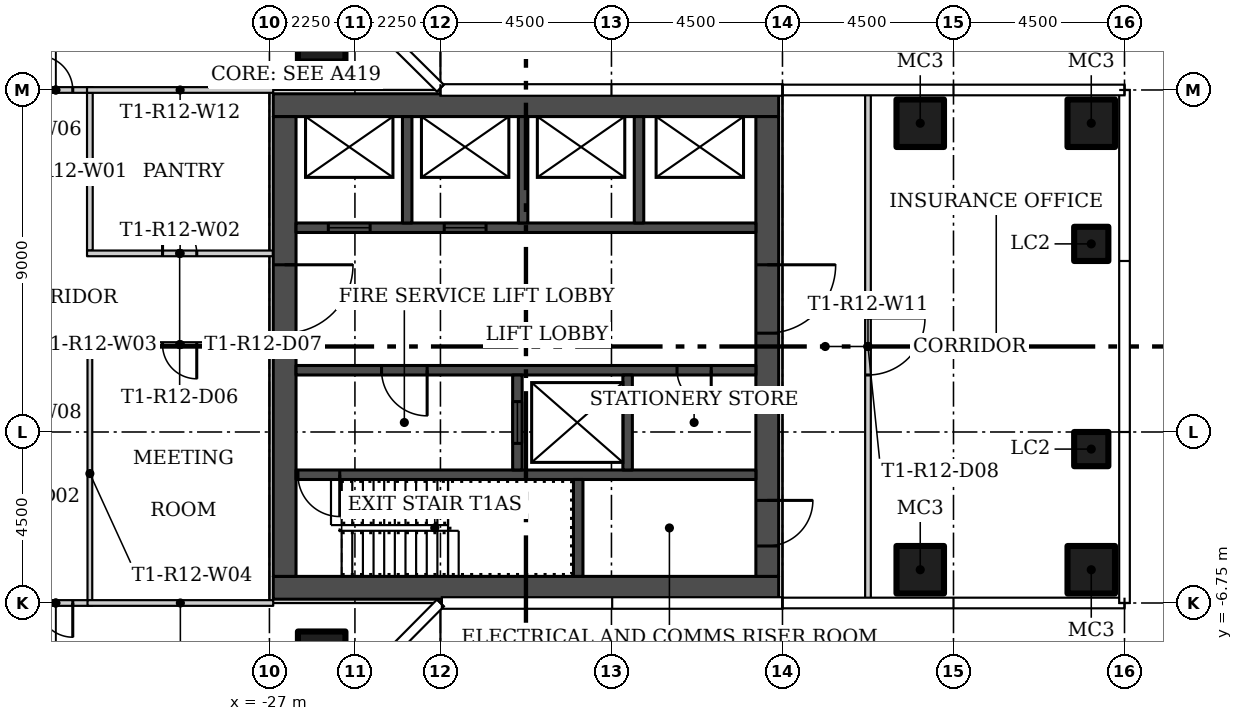
"""IFC4 building model, lengths in metres.
Left out: names, types, materials, properties, quantities, classifications, styles, units other than length and angle.
Written with IfcOpenShell. Run it as: python <this file> out.ifc"""

import sys

from ifc_helpers import new_model, si_unit, direction, frame, frame_2d, origin, origin_2d, place, context, subcontext, project, spatial, rectangle, hollow_rectangle, extrude, element, fill, save


model = new_model("IFC4")
c1 = context("Model", 3, precision=1e-05, world=origin(), true_north=direction((0.0, 1.0)))
c2 = subcontext(c1, "Body", "Model", "MODEL_VIEW")
j1 = project(units=[si_unit("LENGTHUNIT", "METRE"), si_unit("PLANEANGLEUNIT", "RADIAN")], contexts=[c1])
p1 = place(None, origin())
s1 = spatial("IfcSite", under=j1, at=p1, CompositionType="ELEMENT")
p2 = place(p1, origin())
s2 = spatial("IfcBuilding", under=s1, at=p2, CompositionType="ELEMENT")
p3 = place(p2, frame((0.0, 0.0, 113.1)))
s3 = spatial("IfcBuildingStorey", under=s2, at=p3, CompositionType="ELEMENT", Elevation=113.1)
for number, where in (
    (1, (-25.625, 8.125, 0.0)),
    (2, (-25.625, -8.125, 0.0)),
    (3, (-9.875, -5.875, 0.0)),
    (4, (-5.375, -5.875, 0.0)),
    (5, (-9.875, 5.875, 0.0)),
    (6, (-5.375, 5.875, 0.0)),
):
    element("IfcColumn", number, at=place(p3, frame(where)), inside=s3, PredefinedType="COLUMN", context=c2, shape_type="SweptSolid", body=[
        extrude(hollow_rectangle(XDim=1.25, YDim=1.25, WallThickness=0.05, at=origin_2d()), origin(), (0.0, 0.0, 1.0), 3.55),
    ])
for number, where in (
    (7, (-5.375, -2.7, 0.0)),
    (8, (-5.375, 2.7, 0.0)),
):
    element("IfcColumn", number, at=place(p3, frame(where)), inside=s3, PredefinedType="COLUMN", context=c2, shape_type="SweptSolid", body=[
        extrude(hollow_rectangle(XDim=0.9, YDim=0.9, WallThickness=0.036, at=origin_2d()), origin(), (0.0, 0.0, 1.0), 3.55),
    ])
p4 = place(p3, frame((-31.725, 6.675, 0.0), z_axis=(0.0, 0.0, 1.0), x_axis=(0.0, -1.0, 0.0)))
e9 = element("IfcWall", 9, at=p4, inside=s3, PredefinedType="PARTITIONING", context=c2, shape_type="SweptSolid", body=[
    extrude(rectangle(XDim=4.15, YDim=0.15, at=frame_2d((2.075, 0.0))), origin(), (0.0, 0.0, 1.0), 3.55),
])
p5 = place(p3, frame((-31.8, 2.45, 0.0)))
e10 = element("IfcWall", 10, at=p5, inside=s3, PredefinedType="PARTITIONING", context=c2, shape_type="SweptSolid", body=[
    extrude(rectangle(XDim=4.9, YDim=0.15, at=frame_2d((2.45, 0.0))), origin(), (0.0, 0.0, 1.0), 3.55),
])
p6 = place(p5, frame((1.987, 0.0, 0.0)))
e11 = element("IfcOpeningElement", 11, at=p6, cuts=e10, PredefinedType="OPENING", context=c2, shape_type="SweptSolid", body=[
    extrude(rectangle(XDim=0.9, YDim=2.1, at=frame_2d((0.45, 1.05))), frame((0.0, 0.085, 0.0), z_axis=(0.0, -1.0, 0.0), x_axis=(1.0, 0.0, 0.0)), (0.0, 0.0, 1.0), 0.17),
])
p7 = place(p3, frame((-26.9, 0.05, 0.0), z_axis=(0.0, 0.0, 1.0), x_axis=(-1.0, 0.0, 0.0)))
e12 = element("IfcWall", 12, at=p7, inside=s3, PredefinedType="PARTITIONING", context=c2, shape_type="SweptSolid", body=[
    extrude(rectangle(XDim=4.887, YDim=0.125, at=frame_2d((2.444, 0.0))), origin(), (0.0, 0.0, 1.0), 3.55),
])
p8 = place(p7, frame((2.012, 0.0, 0.0)))
e13 = element("IfcOpeningElement", 13, at=p8, cuts=e12, PredefinedType="OPENING", context=c2, shape_type="SweptSolid", body=[
    extrude(rectangle(XDim=0.9, YDim=2.1, at=frame_2d((0.45, 1.05))), frame((0.0, 0.073, 0.0), z_axis=(0.0, -1.0, 0.0), x_axis=(1.0, 0.0, 0.0)), (0.0, 0.0, 1.0), 0.145),
])
p9 = place(p3, frame((-31.725, -0.013, 0.0), z_axis=(0.0, 0.0, 1.0), x_axis=(0.0, -1.0, 0.0)))
e14 = element("IfcWall", 14, at=p9, inside=s3, PredefinedType="PARTITIONING", context=c2, shape_type="SweptSolid", body=[
    extrude(rectangle(XDim=6.662, YDim=0.125, at=frame_2d((3.331, 0.0))), origin(), (0.0, 0.0, 1.0), 3.55),
])
p10 = place(p3, frame((-33.588, 6.75, 0.0)))
e15 = element("IfcWall", 15, at=p10, inside=s3, PredefinedType="PARTITIONING", context=c2, shape_type="SweptSolid", body=[
    extrude(rectangle(XDim=1.938, YDim=0.15, at=frame_2d((0.969, 0.0))), origin(), (0.0, 0.0, 1.0), 3.55),
])
p11 = place(p10, frame((0.513, 0.0, 0.0)))
e16 = element("IfcOpeningElement", 16, at=p11, cuts=e15, PredefinedType="OPENING", context=c2, shape_type="SweptSolid", body=[
    extrude(rectangle(XDim=0.9, YDim=2.1, at=frame_2d((0.45, 1.05))), frame((0.0, 0.085, 0.0), z_axis=(0.0, -1.0, 0.0), x_axis=(1.0, 0.0, 0.0)), (0.0, 0.0, 1.0), 0.17),
])
p12 = place(p3, frame((-31.662, -6.75, 0.0), z_axis=(0.0, 0.0, 1.0), x_axis=(-1.0, 0.0, 0.0)))
e17 = element("IfcWall", 17, at=p12, inside=s3, PredefinedType="PARTITIONING", context=c2, shape_type="SweptSolid", body=[
    extrude(rectangle(XDim=1.913, YDim=0.15, at=frame_2d((0.957, 0.0))), origin(), (0.0, 0.0, 1.0), 3.55),
])
p13 = place(p12, frame((0.513, 0.0, 0.0)))
e18 = element("IfcOpeningElement", 18, at=p13, cuts=e17, PredefinedType="OPENING", context=c2, shape_type="SweptSolid", body=[
    extrude(rectangle(XDim=0.9, YDim=2.1, at=frame_2d((0.45, 1.05))), frame((0.0, 0.085, 0.0), z_axis=(0.0, -1.0, 0.0), x_axis=(1.0, 0.0, 0.0)), (0.0, 0.0, 1.0), 0.17),
])
p14 = place(p3, frame((-11.25, 6.655, 0.0), z_axis=(0.0, 0.0, 1.0), x_axis=(0.0, -1.0, 0.0)))
e19 = element("IfcWall", 19, at=p14, inside=s3, PredefinedType="PARTITIONING", context=c2, shape_type="SweptSolid", body=[
    extrude(rectangle(XDim=13.31, YDim=0.15, at=frame_2d((6.655, 0.0))), origin(), (0.0, 0.0, 1.0), 3.55),
])
p15 = place(p14, frame((5.905, 0.0, 0.0)))
e20 = element("IfcOpeningElement", 20, at=p15, cuts=e19, PredefinedType="OPENING", context=c2, shape_type="SweptSolid", body=[
    extrude(rectangle(XDim=1.5, YDim=2.1, at=frame_2d((0.75, 1.05))), frame((0.0, 0.085, 0.0), z_axis=(0.0, -1.0, 0.0), x_axis=(1.0, 0.0, 0.0)), (0.0, 0.0, 1.0), 0.17),
])
p16 = place(p3, frame((-26.9, 6.75, 0.0), z_axis=(0.0, 0.0, 1.0), x_axis=(-1.0, 0.0, 0.0)))
e21 = element("IfcWall", 21, at=p16, inside=s3, PredefinedType="PARTITIONING", context=c2, shape_type="SweptSolid", body=[
    extrude(rectangle(XDim=4.9, YDim=0.15, at=frame_2d((2.45, 0.0))), origin(), (0.0, 0.0, 1.0), 3.55),
])
p17 = place(p3, frame((-31.787, -6.75, 0.0)))
e22 = element("IfcWall", 22, at=p17, inside=s3, PredefinedType="PARTITIONING", context=c2, shape_type="SweptSolid", body=[
    extrude(rectangle(XDim=4.887, YDim=0.15, at=frame_2d((2.444, 0.0))), origin(), (0.0, 0.0, 1.0), 3.55),
])
for number, where in (
    (23, (-26.9, -6.35, 0.0)),
    (24, (-26.9, 6.35, 0.0)),
):
    element("IfcWall", number, at=place(p3, frame(where)), inside=s3, PredefinedType="SHEAR", context=c2, shape_type="SweptSolid", body=[
        extrude(rectangle(XDim=13.3, YDim=0.6, at=frame_2d((6.65, 0.0))), origin(), (0.0, 0.0, 1.0), 3.55),
    ])
p18 = place(p3, frame((-26.6, 6.05, 0.0), z_axis=(0.0, 0.0, 1.0), x_axis=(0.0, -1.0, 0.0)))
e25 = element("IfcWall", 25, at=p18, inside=s3, PredefinedType="SHEAR", context=c2, shape_type="SweptSolid", body=[
    extrude(rectangle(XDim=12.1, YDim=0.6, at=frame_2d((6.05, 0.0))), origin(), (0.0, 0.0, 1.0), 3.55),
])
p19 = place(p18, frame((3.9, 0.0, 0.0)))
e26 = element("IfcOpeningElement", 26, at=p19, cuts=e25, PredefinedType="OPENING", context=c2, shape_type="SweptSolid", body=[
    extrude(rectangle(XDim=1.8, YDim=2.4, at=frame_2d((0.9, 1.2))), frame((0.0, 0.31, 0.0), z_axis=(0.0, -1.0, 0.0), x_axis=(1.0, 0.0, 0.0)), (0.0, 0.0, 1.0), 0.62),
])
p20 = place(p3, frame((-13.9, 6.05, 0.0), z_axis=(0.0, 0.0, 1.0), x_axis=(0.0, -1.0, 0.0)))
e27 = element("IfcWall", 27, at=p20, inside=s3, PredefinedType="SHEAR", context=c2, shape_type="SweptSolid", body=[
    extrude(rectangle(XDim=12.1, YDim=0.6, at=frame_2d((6.05, 0.0))), origin(), (0.0, 0.0, 1.0), 3.55),
])
p21 = place(p20, frame((10.1, 0.0, 0.0)))
e28 = element("IfcOpeningElement", 28, at=p21, cuts=e27, PredefinedType="OPENING", context=c2, shape_type="SweptSolid", body=[
    extrude(rectangle(XDim=1.2, YDim=2.1, at=frame_2d((0.6, 1.05))), frame((0.0, 0.31, 0.0), z_axis=(0.0, -1.0, 0.0), x_axis=(1.0, 0.0, 0.0)), (0.0, 0.0, 1.0), 0.62),
])
p22 = place(p20, frame((3.9, 0.0, 0.0)))
e29 = element("IfcOpeningElement", 29, at=p22, cuts=e27, PredefinedType="OPENING", context=c2, shape_type="SweptSolid", body=[
    extrude(rectangle(XDim=1.8, YDim=2.4, at=frame_2d((0.9, 1.2))), frame((0.0, 0.31, 0.0), z_axis=(0.0, -1.0, 0.0), x_axis=(1.0, 0.0, 0.0)), (0.0, 0.0, 1.0), 0.62),
])
p23 = place(p3, frame((-14.2, -3.375, 0.0), z_axis=(0.0, 0.0, 1.0), x_axis=(-1.0, 0.0, 0.0)))
e30 = element("IfcWall", 30, at=p23, inside=s3, PredefinedType="SHEAR", context=c2, shape_type="SweptSolid", body=[
    extrude(rectangle(XDim=12.1, YDim=0.25, at=frame_2d((6.05, 0.0))), origin(), (0.0, 0.0, 1.0), 3.55),
])
p24 = place(p23, frame((10.95, 0.0, 0.0)))
e31 = element("IfcOpeningElement", 31, at=p24, cuts=e30, PredefinedType="OPENING", context=c2, shape_type="SweptSolid", body=[
    extrude(rectangle(XDim=1.1, YDim=2.1, at=frame_2d((0.55, 1.05))), frame((0.0, 0.135, 0.0), z_axis=(0.0, -1.0, 0.0), x_axis=(1.0, 0.0, 0.0)), (0.0, 0.0, 1.0), 0.27),
])
p25 = place(p3, frame((-18.875, -6.05, 0.0), z_axis=(0.0, 0.0, 1.0), x_axis=(0.0, 1.0, 0.0)))
e32 = element("IfcWall", 32, at=p25, inside=s3, PredefinedType="SHEAR", context=c2, shape_type="SweptSolid", body=[
    extrude(rectangle(XDim=2.55, YDim=0.25, at=frame_2d((1.275, 0.0))), origin(), (0.0, 0.0, 1.0), 3.55),
])
p26 = place(p3, frame((-14.2, -0.625, 0.0), z_axis=(0.0, 0.0, 1.0), x_axis=(-1.0, 0.0, 0.0)))
e33 = element("IfcWall", 33, at=p26, inside=s3, PredefinedType="SHEAR", context=c2, shape_type="SweptSolid", body=[
    extrude(rectangle(XDim=12.1, YDim=0.25, at=frame_2d((6.05, 0.0))), origin(), (0.0, 0.0, 1.0), 3.55),
])
p27 = place(p26, frame((8.65, 0.0, 0.0)))
e34 = element("IfcOpeningElement", 34, at=p27, cuts=e33, PredefinedType="OPENING", context=c2, shape_type="SweptSolid", body=[
    extrude(rectangle(XDim=1.2, YDim=2.1, at=frame_2d((0.6, 1.05))), frame((0.0, 0.135, 0.0), z_axis=(0.0, -1.0, 0.0), x_axis=(1.0, 0.0, 0.0)), (0.0, 0.0, 1.0), 0.27),
])
p28 = place(p26, frame((1.175, 0.0, 0.0)))
e35 = element("IfcOpeningElement", 35, at=p28, cuts=e33, PredefinedType="OPENING", context=c2, shape_type="SweptSolid", body=[
    extrude(rectangle(XDim=0.9, YDim=2.1, at=frame_2d((0.45, 1.05))), frame((0.0, 0.135, 0.0), z_axis=(0.0, -1.0, 0.0), x_axis=(1.0, 0.0, 0.0)), (0.0, 0.0, 1.0), 0.27),
])
p29 = place(p3, frame((-20.475, -3.25, 0.0), z_axis=(0.0, 0.0, 1.0), x_axis=(0.0, 1.0, 0.0)))
e36 = element("IfcWall", 36, at=p29, inside=s3, PredefinedType="SHEAR", context=c2, shape_type="SweptSolid", body=[
    extrude(rectangle(XDim=2.5, YDim=0.25, at=frame_2d((1.25, 0.0))), origin(), (0.0, 0.0, 1.0), 3.55),
])
p30 = place(p29, frame((0.7, 0.0, 0.0)))
e37 = element("IfcOpeningElement", 37, at=p30, cuts=e36, PredefinedType="OPENING", context=c2, shape_type="SweptSolid", body=[
    extrude(rectangle(XDim=1.1, YDim=2.1, at=frame_2d((0.55, 1.05))), frame((0.0, 0.135, 0.0), z_axis=(0.0, -1.0, 0.0), x_axis=(1.0, 0.0, 0.0)), (0.0, 0.0, 1.0), 0.27),
])
p31 = place(p3, frame((-17.575, -3.25, 0.0), z_axis=(0.0, 0.0, 1.0), x_axis=(0.0, 1.0, 0.0)))
e38 = element("IfcWall", 38, at=p31, inside=s3, PredefinedType="SHEAR", context=c2, shape_type="SweptSolid", body=[
    extrude(rectangle(XDim=2.5, YDim=0.25, at=frame_2d((1.25, 0.0))), origin(), (0.0, 0.0, 1.0), 3.55),
])
p32 = place(p3, frame((-26.3, 3.125, 0.0)))
e39 = element("IfcWall", 39, at=p32, inside=s3, PredefinedType="SHEAR", context=c2, shape_type="SweptSolid", body=[
    extrude(rectangle(XDim=12.1, YDim=0.25, at=frame_2d((6.05, 0.0))), origin(), (0.0, 0.0, 1.0), 3.55),
])
p33 = place(p32, frame((0.85, 0.0, 0.0)))
e40 = element("IfcOpeningElement", 40, at=p33, cuts=e39, PredefinedType="OPENING", context=c2, shape_type="SweptSolid", body=[
    extrude(rectangle(XDim=1.1, YDim=2.1, at=frame_2d((0.55, 1.05))), frame((0.0, 0.135, 0.0), z_axis=(0.0, -1.0, 0.0), x_axis=(1.0, 0.0, 0.0)), (0.0, 0.0, 1.0), 0.27),
])
p34 = place(p32, frame((3.9, 0.0, 0.0)))
e41 = element("IfcOpeningElement", 41, at=p34, cuts=e39, PredefinedType="OPENING", context=c2, shape_type="SweptSolid", body=[
    extrude(rectangle(XDim=1.1, YDim=2.1, at=frame_2d((0.55, 1.05))), frame((0.0, 0.135, 0.0), z_axis=(0.0, -1.0, 0.0), x_axis=(1.0, 0.0, 0.0)), (0.0, 0.0, 1.0), 0.27),
])
for number, where, z_axis, x_axis in (
    (42, (-23.375, 3.25, 0.0), (0.0, 0.0, 1.0), (0.0, 1.0, 0.0)),
    (43, (-20.325, 3.25, 0.0), (0.0, 0.0, 1.0), (0.0, 1.0, 0.0)),
    (44, (-17.275, 3.25, 0.0), (0.0, 0.0, 1.0), (0.0, 1.0, 0.0)),
):
    element("IfcWall", number, at=place(p3, frame(where, z_axis=z_axis, x_axis=x_axis)), inside=s3, PredefinedType="SHEAR", context=c2, shape_type="SweptSolid", body=[
        extrude(rectangle(XDim=2.8, YDim=0.25, at=frame_2d((1.4, 0.0))), origin(), (0.0, 0.0, 1.0), 3.55),
    ])
p35 = place(p11, origin())
e45 = element("IfcDoor", 45, at=p35, inside=s3, OperationType="SINGLE_SWING_LEFT", PredefinedType="DOOR", context=c2, shape_type="SweptSolid", body=[
    extrude(rectangle(XDim=0.9, YDim=2.1, at=frame_2d((0.45, 1.05))), frame((0.0, 0.025, 0.0), z_axis=(0.0, -1.0, 0.0), x_axis=(1.0, 0.0, 0.0)), (0.0, 0.0, 1.0), 0.05),
])
fill(e16, e45)
p36 = place(p13, origin())
e46 = element("IfcDoor", 46, at=p36, inside=s3, OperationType="SINGLE_SWING_RIGHT", PredefinedType="DOOR", context=c2, shape_type="SweptSolid", body=[
    extrude(rectangle(XDim=0.9, YDim=2.1, at=frame_2d((0.45, 1.05))), frame((0.0, 0.025, 0.0), z_axis=(0.0, -1.0, 0.0), x_axis=(1.0, 0.0, 0.0)), (0.0, 0.0, 1.0), 0.05),
])
fill(e18, e46)
p37 = place(p6, origin())
e47 = element("IfcDoor", 47, at=p37, inside=s3, OperationType="SINGLE_SWING_LEFT", PredefinedType="DOOR", context=c2, shape_type="SweptSolid", body=[
    extrude(rectangle(XDim=0.9, YDim=2.1, at=frame_2d((0.45, 1.05))), frame((0.0, 0.025, 0.0), z_axis=(0.0, -1.0, 0.0), x_axis=(1.0, 0.0, 0.0)), (0.0, 0.0, 1.0), 0.05),
])
fill(e11, e47)
p38 = place(p8, origin())
e48 = element("IfcDoor", 48, at=p38, inside=s3, OperationType="SINGLE_SWING_LEFT", PredefinedType="DOOR", context=c2, shape_type="SweptSolid", body=[
    extrude(rectangle(XDim=0.9, YDim=2.1, at=frame_2d((0.45, 1.05))), frame((0.0, 0.025, 0.0), z_axis=(0.0, -1.0, 0.0), x_axis=(1.0, 0.0, 0.0)), (0.0, 0.0, 1.0), 0.05),
])
fill(e13, e48)
p39 = place(p15, origin())
e49 = element("IfcDoor", 49, at=p39, inside=s3, OperationType="DOUBLE_DOOR_SINGLE_SWING", PredefinedType="DOOR", context=c2, shape_type="SweptSolid", body=[
    extrude(rectangle(XDim=1.5, YDim=2.1, at=frame_2d((0.75, 1.05))), frame((0.0, 0.025, 0.0), z_axis=(0.0, -1.0, 0.0), x_axis=(1.0, 0.0, 0.0)), (0.0, 0.0, 1.0), 0.05),
])
fill(e20, e49)
p40 = place(p19, origin())
e50 = element("IfcDoor", 50, at=p40, inside=s3, OperationType="DOUBLE_DOOR_SINGLE_SWING", PredefinedType="DOOR", context=c2, shape_type="SweptSolid", body=[
    extrude(rectangle(XDim=1.8, YDim=2.4, at=frame_2d((0.9, 1.2))), frame((0.0, 0.025, 0.0), z_axis=(0.0, -1.0, 0.0), x_axis=(1.0, 0.0, 0.0)), (0.0, 0.0, 1.0), 0.05),
])
fill(e26, e50)
p41 = place(p21, origin())
e51 = element("IfcDoor", 51, at=p41, inside=s3, OperationType="SINGLE_SWING_RIGHT", PredefinedType="DOOR", context=c2, shape_type="SweptSolid", body=[
    extrude(rectangle(XDim=1.2, YDim=2.1, at=frame_2d((0.6, 1.05))), frame((0.0, 0.025, 0.0), z_axis=(0.0, -1.0, 0.0), x_axis=(1.0, 0.0, 0.0)), (0.0, 0.0, 1.0), 0.05),
])
fill(e28, e51)
p42 = place(p22, origin())
e52 = element("IfcDoor", 52, at=p42, inside=s3, OperationType="DOUBLE_DOOR_SINGLE_SWING", PredefinedType="DOOR", context=c2, shape_type="SweptSolid", body=[
    extrude(rectangle(XDim=1.8, YDim=2.4, at=frame_2d((0.9, 1.2))), frame((0.0, 0.025, 0.0), z_axis=(0.0, -1.0, 0.0), x_axis=(1.0, 0.0, 0.0)), (0.0, 0.0, 1.0), 0.05),
])
fill(e29, e52)
p43 = place(p24, origin())
e53 = element("IfcDoor", 53, at=p43, inside=s3, OperationType="SINGLE_SWING_RIGHT", PredefinedType="DOOR", context=c2, shape_type="SweptSolid", body=[
    extrude(rectangle(XDim=1.1, YDim=2.1, at=frame_2d((0.55, 1.05))), frame((0.0, 0.025, 0.0), z_axis=(0.0, -1.0, 0.0), x_axis=(1.0, 0.0, 0.0)), (0.0, 0.0, 1.0), 0.05),
])
fill(e31, e53)
p44 = place(p27, origin())
e54 = element("IfcDoor", 54, at=p44, inside=s3, OperationType="SINGLE_SWING_RIGHT", PredefinedType="DOOR", context=c2, shape_type="SweptSolid", body=[
    extrude(rectangle(XDim=1.2, YDim=2.1, at=frame_2d((0.6, 1.05))), frame((0.0, 0.025, 0.0), z_axis=(0.0, -1.0, 0.0), x_axis=(1.0, 0.0, 0.0)), (0.0, 0.0, 1.0), 0.05),
])
fill(e34, e54)
p45 = place(p28, origin())
e55 = element("IfcDoor", 55, at=p45, inside=s3, OperationType="SINGLE_SWING_LEFT", PredefinedType="DOOR", context=c2, shape_type="SweptSolid", body=[
    extrude(rectangle(XDim=0.9, YDim=2.1, at=frame_2d((0.45, 1.05))), frame((0.0, 0.025, 0.0), z_axis=(0.0, -1.0, 0.0), x_axis=(1.0, 0.0, 0.0)), (0.0, 0.0, 1.0), 0.05),
])
fill(e35, e55)
p46 = place(p30, origin())
e56 = element("IfcDoor", 56, at=p46, inside=s3, OperationType="SLIDING_TO_LEFT", PredefinedType="DOOR", context=c2, shape_type="SweptSolid", body=[
    extrude(rectangle(XDim=1.1, YDim=2.1, at=frame_2d((0.55, 1.05))), frame((0.0, 0.025, 0.0), z_axis=(0.0, -1.0, 0.0), x_axis=(1.0, 0.0, 0.0)), (0.0, 0.0, 1.0), 0.05),
])
fill(e37, e56)
p47 = place(p33, origin())
e57 = element("IfcDoor", 57, at=p47, inside=s3, OperationType="SLIDING_TO_LEFT", PredefinedType="DOOR", context=c2, shape_type="SweptSolid", body=[
    extrude(rectangle(XDim=1.1, YDim=2.1, at=frame_2d((0.55, 1.05))), frame((0.0, 0.025, 0.0), z_axis=(0.0, -1.0, 0.0), x_axis=(1.0, 0.0, 0.0)), (0.0, 0.0, 1.0), 0.05),
])
fill(e40, e57)
p48 = place(p34, origin())
e58 = element("IfcDoor", 58, at=p48, inside=s3, OperationType="SLIDING_TO_LEFT", PredefinedType="DOOR", context=c2, shape_type="SweptSolid", body=[
    extrude(rectangle(XDim=1.1, YDim=2.1, at=frame_2d((0.55, 1.05))), frame((0.0, 0.025, 0.0), z_axis=(0.0, -1.0, 0.0), x_axis=(1.0, 0.0, 0.0)), (0.0, 0.0, 1.0), 0.05),
])
fill(e41, e58)
save(model, sys.argv[1])
